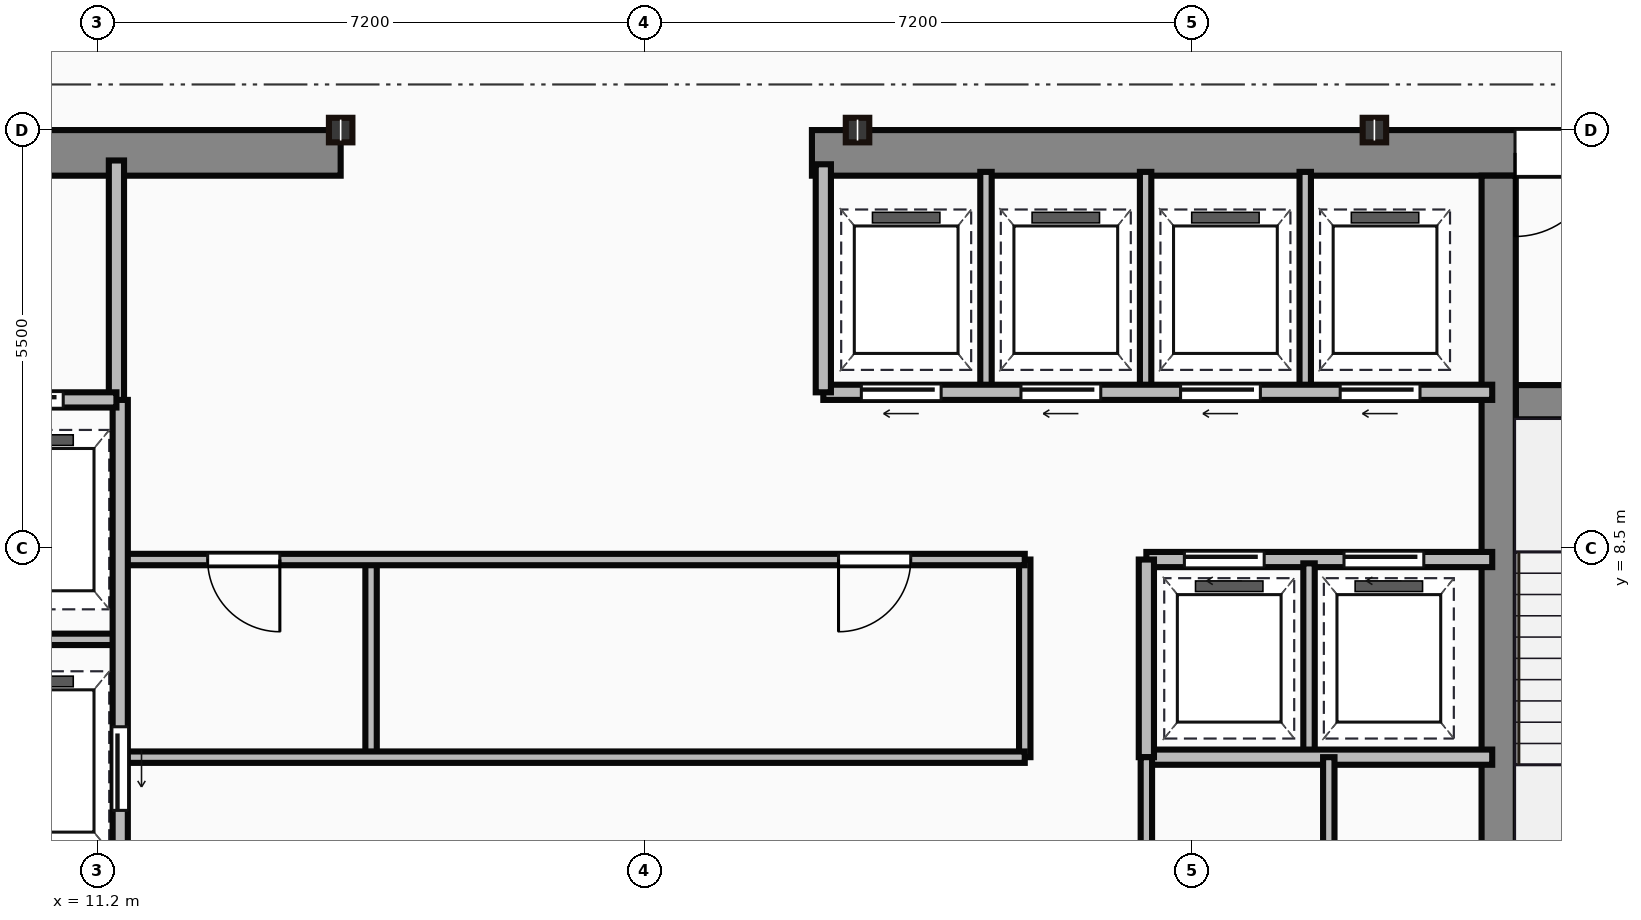
"""IFC4 building model, lengths in metres.
Left out: names, types, materials, properties, quantities, classifications, styles, units other than length and angle.
Written with IfcOpenShell. Run it as: python <this file> out.ifc"""

import sys

from ifc_helpers import new_model, si_unit, direction, frame, frame_2d, origin, origin_2d, place, context, subcontext, project, spatial, rectangle, i_section, extrude, source, transform, mapped, element, fill, save


model = new_model("IFC4")
c1 = context("Model", 3, precision=1e-05, world=origin(), true_north=direction((0.0, 1.0)))
c2 = subcontext(c1, "Body", "Model", "MODEL_VIEW")
j1 = project(units=[si_unit("LENGTHUNIT", "METRE"), si_unit("PLANEANGLEUNIT", "RADIAN")], contexts=[c1])
p1 = place(None, origin())
s1 = spatial("IfcSite", under=j1, at=p1, CompositionType="ELEMENT")
p2 = place(p1, origin())
s2 = spatial("IfcBuilding", under=s1, at=p2, CompositionType="ELEMENT")
p3 = place(p2, frame((0.0, 0.0, 192.25)))
s3 = spatial("IfcBuildingStorey", under=s2, at=p3, CompositionType="ELEMENT", Elevation=192.25)
m1 = source(origin(), c2, "Body", "SweptSolid", [
    extrude(rectangle(XDim=9.1, YDim=0.6, at=frame_2d((4.55, 0.0))), origin(), (0.0, 0.0, 1.0), 3.65),
])
p4 = place(p3, frame((5.3, 13.7, 0.0), z_axis=(0.0, 0.0, 1.0), x_axis=(1.0, 0.0, 0.0)))
e1 = element("IfcWall", 1, at=p4, inside=s3, PredefinedType="SHEAR", context=c2, shape_type="MappedRepresentation", body=[
    mapped(m1, transform((0.0, 0.0, 0.0))),
])
p5 = place(p4, frame((4.1, 0.0, 0.0)))
e2 = element("IfcOpeningElement", 2, at=p5, cuts=e1, PredefinedType="OPENING", context=c2, shape_type="SweptSolid", body=[
    extrude(rectangle(XDim=1.1, YDim=2.15, at=frame_2d((0.55, 1.075))), frame((0.0, 0.31, 0.0), z_axis=(0.0, -1.0, 0.0), x_axis=(1.0, 0.0, 0.0)), (0.0, 0.0, 1.0), 0.62),
])
m2 = source(origin(), c2, "Body", "SweptSolid", [
    extrude(rectangle(XDim=12.6, YDim=0.6, at=frame_2d((6.3, 0.0))), origin(), (0.0, 0.0, 1.0), 3.65),
])
p6 = place(p3, frame((20.6, 13.7, 0.0), z_axis=(0.0, 0.0, 1.0), x_axis=(1.0, 0.0, 0.0)))
e3 = element("IfcWall", 3, at=p6, inside=s3, PredefinedType="SHEAR", context=c2, shape_type="MappedRepresentation", body=[
    mapped(m2, transform((0.0, 0.0, 0.0))),
])
p7 = place(p6, frame((9.25, 0.0, 0.0)))
e4 = element("IfcOpeningElement", 4, at=p7, cuts=e3, PredefinedType="OPENING", context=c2, shape_type="SweptSolid", body=[
    extrude(rectangle(XDim=1.1, YDim=2.15, at=frame_2d((0.55, 1.075))), frame((0.0, 0.31, 0.0), z_axis=(0.0, -1.0, 0.0), x_axis=(1.0, 0.0, 0.0)), (0.0, 0.0, 1.0), 0.62),
])
m3 = source(origin(), c2, "Body", "SweptSolid", [
    extrude(rectangle(XDim=12.5, YDim=0.45, at=frame_2d((6.25, 0.0))), origin(), (0.0, 0.0, 1.0), 3.65),
])
p8 = place(p3, frame((29.635, 0.9, 0.0), z_axis=(0.0, 0.0, 1.0), x_axis=(0.0, 1.0, 0.0)))
e5 = element("IfcWall", 5, at=p8, inside=s3, PredefinedType="SHEAR", context=c2, shape_type="MappedRepresentation", body=[
    mapped(m3, transform((0.0, 0.0, 0.0))),
])
m4 = source(origin(), c2, "Body", "SweptSolid", [
    extrude(rectangle(XDim=3.39, YDim=0.45, at=frame_2d((1.695, 0.0))), origin(), (0.0, 0.0, 1.0), 3.65),
])
p9 = place(p3, frame((29.86, 10.42, 0.0), z_axis=(0.0, 0.0, 1.0), x_axis=(1.0, 0.0, 0.0)))
e6 = element("IfcWall", 6, at=p9, inside=s3, PredefinedType="SHEAR", context=c2, shape_type="MappedRepresentation", body=[
    mapped(m4, transform((0.0, 0.0, 0.0))),
])
p10 = place(p9, frame((1.1, 0.0, 0.0)))
e7 = element("IfcOpeningElement", 7, at=p10, cuts=e6, PredefinedType="OPENING", context=c2, shape_type="SweptSolid", body=[
    extrude(rectangle(XDim=1.1, YDim=2.15, at=frame_2d((0.55, 1.075))), frame((0.0, 0.235, 0.0), z_axis=(0.0, -1.0, 0.0), x_axis=(1.0, 0.0, 0.0)), (0.0, 0.0, 1.0), 0.47),
])
m5 = source(origin(), c2, "Body", "SweptSolid", [
    extrude(i_section(OverallWidth=0.309, OverallDepth=0.323, WebThickness=0.014, FlangeThickness=0.023, at=origin_2d()), origin(), (0.0, 0.0, 1.0), 3.65),
])
for number, where, z_axis, x_axis in (
    (8, (14.4, 14.0, 0.0), (0.0, 0.0, 1.0), (1.0, 0.0, 0.0)),
    (9, (21.2, 14.0, 0.0), (0.0, 0.0, 1.0), (1.0, 0.0, 0.0)),
    (10, (28.0, 14.0, 0.0), (0.0, 0.0, 1.0), (1.0, 0.0, 0.0)),
):
    element("IfcColumn", number, at=place(p3, frame(where, z_axis=z_axis, x_axis=x_axis)), inside=s3, PredefinedType="COLUMN", context=c2, shape_type="MappedRepresentation", body=[
        mapped(m5, transform((0.0, 0.0, 0.0))),
    ])
m6 = source(origin(), c2, "Body", "SweptSolid", [
    extrude(rectangle(XDim=3.18, YDim=0.2, at=frame_2d((1.59, 0.0))), origin(), (0.0, 0.0, 1.0), 3.4),
])
p11 = place(p3, frame((11.45, 10.42, 0.0), z_axis=(0.0, 0.0, 1.0), x_axis=(0.0, 1.0, 0.0)))
e11 = element("IfcWall", 11, at=p11, inside=s3, PredefinedType="PARTITIONING", context=c2, shape_type="MappedRepresentation", body=[
    mapped(m6, transform((0.0, 0.0, 0.0))),
])
m7 = source(origin(), c2, "Body", "SweptSolid", [
    extrude(rectangle(XDim=2.35, YDim=0.2, at=frame_2d((1.175, 0.0))), origin(), (0.0, 0.0, 1.0), 3.4),
])
p12 = place(p3, frame((9.1, 10.45, 0.0), z_axis=(0.0, 0.0, 1.0), x_axis=(1.0, 0.0, 0.0)))
e12 = element("IfcWall", 12, at=p12, inside=s3, PredefinedType="PARTITIONING", context=c2, shape_type="MappedRepresentation", body=[
    mapped(m7, transform((0.0, 0.0, 0.0))),
])
p13 = place(p12, frame((0.55, 0.0, 0.0)))
e13 = element("IfcOpeningElement", 13, at=p13, cuts=e12, PredefinedType="OPENING", context=c2, shape_type="SweptSolid", body=[
    extrude(rectangle(XDim=1.1, YDim=2.15, at=frame_2d((0.55, 1.075))), frame((0.0, 0.11, 0.0), z_axis=(0.0, -1.0, 0.0), x_axis=(1.0, 0.0, 0.0)), (0.0, 0.0, 1.0), 0.22),
])
m8 = source(origin(), c2, "Body", "SweptSolid", [
    extrude(rectangle(XDim=9.6, YDim=0.2, at=frame_2d((4.8, 0.0))), origin(), (0.0, 0.0, 1.0), 3.4),
])
p14 = place(p3, frame((11.5, 0.85, 0.0), z_axis=(0.0, 0.0, 1.0), x_axis=(0.0, 1.0, 0.0)))
e14 = element("IfcWall", 14, at=p14, inside=s3, PredefinedType="PARTITIONING", context=c2, shape_type="MappedRepresentation", body=[
    mapped(m8, transform((0.0, 0.0, 0.0))),
])
p15 = place(p14, frame((4.2, 0.0, 0.0)))
e15 = element("IfcOpeningElement", 15, at=p15, cuts=e14, PredefinedType="OPENING", context=c2, shape_type="SweptSolid", body=[
    extrude(rectangle(XDim=1.1, YDim=2.15, at=frame_2d((0.55, 1.075))), frame((0.0, 0.11, 0.0), z_axis=(0.0, -1.0, 0.0), x_axis=(1.0, 0.0, 0.0)), (0.0, 0.0, 1.0), 0.22),
])
p16 = place(p14, frame((0.9, 0.0, 0.0)))
e16 = element("IfcOpeningElement", 16, at=p16, cuts=e14, PredefinedType="OPENING", context=c2, shape_type="SweptSolid", body=[
    extrude(rectangle(XDim=1.2, YDim=2.15, at=frame_2d((0.6, 1.075))), frame((0.0, 0.11, 0.0), z_axis=(0.0, -1.0, 0.0), x_axis=(1.0, 0.0, 0.0)), (0.0, 0.0, 1.0), 0.22),
])
m9 = source(origin(), c2, "Body", "SweptSolid", [
    extrude(rectangle(XDim=2.4, YDim=0.15, at=frame_2d((1.2, 0.0))), origin(), (0.0, 0.0, 1.0), 3.4),
])
p17 = place(p3, frame((9.1, 7.3, 0.0), z_axis=(0.0, 0.0, 1.0), x_axis=(1.0, 0.0, 0.0)))
e17 = element("IfcWall", 17, at=p17, inside=s3, PredefinedType="PARTITIONING", context=c2, shape_type="MappedRepresentation", body=[
    mapped(m9, transform((0.0, 0.0, 0.0))),
])
m10 = source(origin(), c2, "Body", "SweptSolid", [
    extrude(rectangle(XDim=11.85, YDim=0.15, at=frame_2d((5.925, 0.0))), origin(), (0.0, 0.0, 1.0), 3.4),
])
p18 = place(p3, frame((11.55, 5.75, 0.0), z_axis=(0.0, 0.0, 1.0), x_axis=(1.0, 0.0, 0.0)))
e18 = element("IfcWall", 18, at=p18, inside=s3, PredefinedType="PARTITIONING", context=c2, shape_type="MappedRepresentation", body=[
    mapped(m10, transform((0.0, 0.0, 0.0))),
])
p19 = place(p3, frame((11.55, 8.35, 0.0), z_axis=(0.0, 0.0, 1.0), x_axis=(1.0, 0.0, 0.0)))
e19 = element("IfcWall", 19, at=p19, inside=s3, PredefinedType="PARTITIONING", context=c2, shape_type="MappedRepresentation", body=[
    mapped(m10, transform((0.0, 0.0, 0.0))),
])
p20 = place(p19, frame((1.1, 0.0, 0.0)))
e20 = element("IfcOpeningElement", 20, at=p20, cuts=e19, PredefinedType="OPENING", context=c2, shape_type="SweptSolid", body=[
    extrude(rectangle(XDim=0.95, YDim=2.15, at=frame_2d((0.475, 1.075))), frame((0.0, 0.085, 0.0), z_axis=(0.0, -1.0, 0.0), x_axis=(1.0, 0.0, 0.0)), (0.0, 0.0, 1.0), 0.17),
])
p21 = place(p19, frame((9.4, 0.0, 0.0)))
e21 = element("IfcOpeningElement", 21, at=p21, cuts=e19, PredefinedType="OPENING", context=c2, shape_type="SweptSolid", body=[
    extrude(rectangle(XDim=0.95, YDim=2.15, at=frame_2d((0.475, 1.075))), frame((0.0, 0.085, 0.0), z_axis=(0.0, -1.0, 0.0), x_axis=(1.0, 0.0, 0.0)), (0.0, 0.0, 1.0), 0.17),
])
m11 = source(origin(), c2, "Body", "SweptSolid", [
    extrude(rectangle(XDim=2.6, YDim=0.15, at=frame_2d((1.3, 0.0))), origin(), (0.0, 0.0, 1.0), 3.4),
])
p22 = place(p3, frame((23.4, 5.75, 0.0), z_axis=(0.0, 0.0, 1.0), x_axis=(0.0, 1.0, 0.0)))
e22 = element("IfcWall", 22, at=p22, inside=s3, PredefinedType="PARTITIONING", context=c2, shape_type="MappedRepresentation", body=[
    mapped(m11, transform((0.0, 0.0, 0.0))),
])
m12 = source(origin(), c2, "Body", "SweptSolid", [
    extrude(rectangle(XDim=2.5, YDim=0.15, at=frame_2d((1.25, 0.0))), origin(), (0.0, 0.0, 1.0), 3.4),
])
p23 = place(p3, frame((14.8, 5.8, 0.0), z_axis=(0.0, 0.0, 1.0), x_axis=(0.0, 1.0, 0.0)))
e23 = element("IfcWall", 23, at=p23, inside=s3, PredefinedType="PARTITIONING", context=c2, shape_type="MappedRepresentation", body=[
    mapped(m12, transform((0.0, 0.0, 0.0))),
])
m13 = source(origin(), c2, "Body", "SweptSolid", [
    extrude(rectangle(XDim=8.8, YDim=0.2, at=frame_2d((4.4, 0.0))), origin(), (0.0, 0.0, 1.0), 3.4),
])
p24 = place(p3, frame((20.75, 10.55, 0.0), z_axis=(0.0, 0.0, 1.0), x_axis=(1.0, 0.0, 0.0)))
e24 = element("IfcWall", 24, at=p24, inside=s3, PredefinedType="PARTITIONING", context=c2, shape_type="MappedRepresentation", body=[
    mapped(m13, transform((0.0, 0.0, 0.0))),
])
p25 = place(p24, frame((0.5, 0.0, 0.0)))
e25 = element("IfcOpeningElement", 25, at=p25, cuts=e24, PredefinedType="OPENING", context=c2, shape_type="SweptSolid", body=[
    extrude(rectangle(XDim=1.05, YDim=2.15, at=frame_2d((0.525, 1.075))), frame((0.0, 0.11, 0.0), z_axis=(0.0, -1.0, 0.0), x_axis=(1.0, 0.0, 0.0)), (0.0, 0.0, 1.0), 0.22),
])
p26 = place(p24, frame((2.6, 0.0, 0.0)))
e26 = element("IfcOpeningElement", 26, at=p26, cuts=e24, PredefinedType="OPENING", context=c2, shape_type="SweptSolid", body=[
    extrude(rectangle(XDim=1.05, YDim=2.15, at=frame_2d((0.525, 1.075))), frame((0.0, 0.11, 0.0), z_axis=(0.0, -1.0, 0.0), x_axis=(1.0, 0.0, 0.0)), (0.0, 0.0, 1.0), 0.22),
])
p27 = place(p24, frame((4.7, 0.0, 0.0)))
e27 = element("IfcOpeningElement", 27, at=p27, cuts=e24, PredefinedType="OPENING", context=c2, shape_type="SweptSolid", body=[
    extrude(rectangle(XDim=1.05, YDim=2.15, at=frame_2d((0.525, 1.075))), frame((0.0, 0.11, 0.0), z_axis=(0.0, -1.0, 0.0), x_axis=(1.0, 0.0, 0.0)), (0.0, 0.0, 1.0), 0.22),
])
p28 = place(p24, frame((6.8, 0.0, 0.0)))
e28 = element("IfcOpeningElement", 28, at=p28, cuts=e24, PredefinedType="OPENING", context=c2, shape_type="SweptSolid", body=[
    extrude(rectangle(XDim=1.05, YDim=2.15, at=frame_2d((0.525, 1.075))), frame((0.0, 0.11, 0.0), z_axis=(0.0, -1.0, 0.0), x_axis=(1.0, 0.0, 0.0)), (0.0, 0.0, 1.0), 0.22),
])
m14 = source(origin(), c2, "Body", "SweptSolid", [
    extrude(rectangle(XDim=3.0, YDim=0.2, at=frame_2d((1.5, 0.0))), origin(), (0.0, 0.0, 1.0), 3.4),
])
p29 = place(p3, frame((20.75, 10.55, 0.0), z_axis=(0.0, 0.0, 1.0), x_axis=(0.0, 1.0, 0.0)))
e29 = element("IfcWall", 29, at=p29, inside=s3, PredefinedType="PARTITIONING", context=c2, shape_type="MappedRepresentation", body=[
    mapped(m14, transform((0.0, 0.0, 0.0))),
])
m15 = source(origin(), c2, "Body", "SweptSolid", [
    extrude(rectangle(XDim=2.85, YDim=0.15, at=frame_2d((1.425, 0.0))), origin(), (0.0, 0.0, 1.0), 3.4),
])
for number, where, z_axis, x_axis in (
    (30, (22.89, 10.6, 0.0), (0.0, 0.0, 1.0), (0.0, 1.0, 0.0)),
    (31, (24.99, 10.6, 0.0), (0.0, 0.0, 1.0), (0.0, 1.0, 0.0)),
    (32, (27.09, 10.6, 0.0), (0.0, 0.0, 1.0), (0.0, 1.0, 0.0)),
):
    element("IfcWall", number, at=place(p3, frame(where, z_axis=z_axis, x_axis=x_axis)), inside=s3, PredefinedType="PARTITIONING", context=c2, shape_type="MappedRepresentation", body=[
        mapped(m15, transform((0.0, 0.0, 0.0))),
    ])
m16 = source(origin(), c2, "Body", "SweptSolid", [
    extrude(rectangle(XDim=4.55, YDim=0.2, at=frame_2d((2.275, 0.0))), origin(), (0.0, 0.0, 1.0), 3.4),
])
p30 = place(p3, frame((25.0, 8.35, 0.0), z_axis=(0.0, 0.0, 1.0), x_axis=(1.0, 0.0, 0.0)))
e33 = element("IfcWall", 33, at=p30, inside=s3, PredefinedType="PARTITIONING", context=c2, shape_type="MappedRepresentation", body=[
    mapped(m16, transform((0.0, 0.0, 0.0))),
])
p31 = place(p30, frame((0.5, 0.0, 0.0)))
e34 = element("IfcOpeningElement", 34, at=p31, cuts=e33, PredefinedType="OPENING", context=c2, shape_type="SweptSolid", body=[
    extrude(rectangle(XDim=1.05, YDim=2.15, at=frame_2d((0.525, 1.075))), frame((0.0, 0.11, 0.0), z_axis=(0.0, -1.0, 0.0), x_axis=(1.0, 0.0, 0.0)), (0.0, 0.0, 1.0), 0.22),
])
p32 = place(p30, frame((2.6, 0.0, 0.0)))
e35 = element("IfcOpeningElement", 35, at=p32, cuts=e33, PredefinedType="OPENING", context=c2, shape_type="SweptSolid", body=[
    extrude(rectangle(XDim=1.05, YDim=2.15, at=frame_2d((0.525, 1.075))), frame((0.0, 0.11, 0.0), z_axis=(0.0, -1.0, 0.0), x_axis=(1.0, 0.0, 0.0)), (0.0, 0.0, 1.0), 0.22),
])
p33 = place(p3, frame((25.0, 5.75, 0.0), z_axis=(0.0, 0.0, 1.0), x_axis=(1.0, 0.0, 0.0)))
e36 = element("IfcWall", 36, at=p33, inside=s3, PredefinedType="PARTITIONING", context=c2, shape_type="MappedRepresentation", body=[
    mapped(m16, transform((0.0, 0.0, 0.0))),
])
m17 = source(origin(), c2, "Body", "SweptSolid", [
    extrude(rectangle(XDim=2.6, YDim=0.2, at=frame_2d((1.3, 0.0))), origin(), (0.0, 0.0, 1.0), 3.4),
])
p34 = place(p3, frame((25.0, 5.75, 0.0), z_axis=(0.0, 0.0, 1.0), x_axis=(0.0, 1.0, 0.0)))
e37 = element("IfcWall", 37, at=p34, inside=s3, PredefinedType="PARTITIONING", context=c2, shape_type="MappedRepresentation", body=[
    mapped(m17, transform((0.0, 0.0, 0.0))),
])
p35 = place(p3, frame((27.14, 5.8, 0.0), z_axis=(0.0, 0.0, 1.0), x_axis=(0.0, 1.0, 0.0)))
e38 = element("IfcWall", 38, at=p35, inside=s3, PredefinedType="PARTITIONING", context=c2, shape_type="MappedRepresentation", body=[
    mapped(m12, transform((0.0, 0.0, 0.0))),
])
m18 = source(origin(), c2, "Body", "SweptSolid", [
    extrude(rectangle(XDim=4.9, YDim=0.15, at=frame_2d((2.45, 0.0))), origin(), (0.0, 0.0, 1.0), 3.4),
])
p36 = place(p3, frame((25.0, 0.85, 0.0), z_axis=(0.0, 0.0, 1.0), x_axis=(0.0, 1.0, 0.0)))
e39 = element("IfcWall", 39, at=p36, inside=s3, PredefinedType="PARTITIONING", context=c2, shape_type="MappedRepresentation", body=[
    mapped(m18, transform((0.0, 0.0, 0.0))),
])
p37 = place(p36, frame((2.5, 0.0, 0.0)))
e40 = element("IfcOpeningElement", 40, at=p37, cuts=e39, PredefinedType="OPENING", context=c2, shape_type="SweptSolid", body=[
    extrude(rectangle(XDim=0.95, YDim=2.15, at=frame_2d((0.475, 1.075))), frame((0.0, 0.085, 0.0), z_axis=(0.0, -1.0, 0.0), x_axis=(1.0, 0.0, 0.0)), (0.0, 0.0, 1.0), 0.17),
])
m19 = source(origin(), c2, "Body", "SweptSolid", [
    extrude(rectangle(XDim=3.4, YDim=0.15, at=frame_2d((1.7, 0.0))), origin(), (0.0, 0.0, 1.0), 3.4),
])
p38 = place(p3, frame((27.4, 2.35, 0.0), z_axis=(0.0, 0.0, 1.0), x_axis=(0.0, 1.0, 0.0)))
e41 = element("IfcWall", 41, at=p38, inside=s3, PredefinedType="PARTITIONING", context=c2, shape_type="MappedRepresentation", body=[
    mapped(m19, transform((0.0, 0.0, 0.0))),
])
p39 = place(p38, frame((1.1, 0.0, 0.0)))
e42 = element("IfcOpeningElement", 42, at=p39, cuts=e41, PredefinedType="OPENING", context=c2, shape_type="SweptSolid", body=[
    extrude(rectangle(XDim=0.85, YDim=2.1, at=frame_2d((0.425, 1.05))), frame((0.0, 0.085, 0.0), z_axis=(0.0, -1.0, 0.0), x_axis=(1.0, 0.0, 0.0)), (0.0, 0.0, 1.0), 0.17),
])
m20 = source(origin(), c2, "Body", "SweptSolid", [
    extrude(rectangle(XDim=1.1, YDim=2.15, at=frame_2d((0.55, 1.075))), frame((0.0, 0.025, 0.0), z_axis=(0.0, -1.0, 0.0), x_axis=(1.0, 0.0, 0.0)), (0.0, 0.0, 1.0), 0.05),
])
p40 = place(p7, origin())
e43 = element("IfcDoor", 43, at=p40, inside=s3, OperationType="SINGLE_SWING_LEFT", PredefinedType="DOOR", context=c2, shape_type="MappedRepresentation", body=[
    mapped(m20, transform((0.0, 0.0, 0.0))),
])
fill(e4, e43)
p41 = place(p13, origin())
e44 = element("IfcDoor", 44, at=p41, inside=s3, OperationType="SLIDING_TO_LEFT", PredefinedType="DOOR", context=c2, shape_type="MappedRepresentation", body=[
    mapped(m20, transform((0.0, 0.0, 0.0))),
])
fill(e13, e44)
p42 = place(p15, frame((1.1, 0.0, 0.0), z_axis=(0.0, 0.0, 1.0), x_axis=(-1.0, 0.0, 0.0)))
e45 = element("IfcDoor", 45, at=p42, inside=s3, OperationType="SLIDING_TO_LEFT", PredefinedType="DOOR", context=c2, shape_type="MappedRepresentation", body=[
    mapped(m20, transform((0.0, 0.0, 0.0))),
])
fill(e15, e45)
m21 = source(origin(), c2, "Body", "SweptSolid", [
    extrude(rectangle(XDim=0.95, YDim=2.15, at=frame_2d((0.475, 1.075))), frame((0.0, 0.025, 0.0), z_axis=(0.0, -1.0, 0.0), x_axis=(1.0, 0.0, 0.0)), (0.0, 0.0, 1.0), 0.05),
])
p43 = place(p20, origin())
e46 = element("IfcDoor", 46, at=p43, inside=s3, OperationType="SINGLE_SWING_RIGHT", PredefinedType="DOOR", context=c2, shape_type="MappedRepresentation", body=[
    mapped(m21, transform((0.0, 0.0, 0.0))),
])
fill(e20, e46)
p44 = place(p21, origin())
e47 = element("IfcDoor", 47, at=p44, inside=s3, OperationType="SINGLE_SWING_LEFT", PredefinedType="DOOR", context=c2, shape_type="MappedRepresentation", body=[
    mapped(m21, transform((0.0, 0.0, 0.0))),
])
fill(e21, e47)
m22 = source(origin(), c2, "Body", "SweptSolid", [
    extrude(rectangle(XDim=1.05, YDim=2.15, at=frame_2d((0.525, 1.075))), frame((0.0, 0.025, 0.0), z_axis=(0.0, -1.0, 0.0), x_axis=(1.0, 0.0, 0.0)), (0.0, 0.0, 1.0), 0.05),
])
p45 = place(p25, frame((1.05, 0.0, 0.0), z_axis=(0.0, 0.0, 1.0), x_axis=(-1.0, 0.0, 0.0)))
e48 = element("IfcDoor", 48, at=p45, inside=s3, OperationType="SLIDING_TO_LEFT", PredefinedType="DOOR", context=c2, shape_type="MappedRepresentation", body=[
    mapped(m22, transform((0.0, 0.0, 0.0))),
])
fill(e25, e48)
p46 = place(p26, frame((1.05, 0.0, 0.0), z_axis=(0.0, 0.0, 1.0), x_axis=(-1.0, 0.0, 0.0)))
e49 = element("IfcDoor", 49, at=p46, inside=s3, OperationType="SLIDING_TO_LEFT", PredefinedType="DOOR", context=c2, shape_type="MappedRepresentation", body=[
    mapped(m22, transform((0.0, 0.0, 0.0))),
])
fill(e26, e49)
p47 = place(p27, frame((1.05, 0.0, 0.0), z_axis=(0.0, 0.0, 1.0), x_axis=(-1.0, 0.0, 0.0)))
e50 = element("IfcDoor", 50, at=p47, inside=s3, OperationType="SLIDING_TO_LEFT", PredefinedType="DOOR", context=c2, shape_type="MappedRepresentation", body=[
    mapped(m22, transform((0.0, 0.0, 0.0))),
])
fill(e27, e50)
p48 = place(p28, frame((1.05, 0.0, 0.0), z_axis=(0.0, 0.0, 1.0), x_axis=(-1.0, 0.0, 0.0)))
e51 = element("IfcDoor", 51, at=p48, inside=s3, OperationType="SLIDING_TO_LEFT", PredefinedType="DOOR", context=c2, shape_type="MappedRepresentation", body=[
    mapped(m22, transform((0.0, 0.0, 0.0))),
])
fill(e28, e51)
p49 = place(p31, origin())
e52 = element("IfcDoor", 52, at=p49, inside=s3, OperationType="SLIDING_TO_LEFT", PredefinedType="DOOR", context=c2, shape_type="MappedRepresentation", body=[
    mapped(m22, transform((0.0, 0.0, 0.0))),
])
fill(e34, e52)
p50 = place(p32, origin())
e53 = element("IfcDoor", 53, at=p50, inside=s3, OperationType="SLIDING_TO_LEFT", PredefinedType="DOOR", context=c2, shape_type="MappedRepresentation", body=[
    mapped(m22, transform((0.0, 0.0, 0.0))),
])
fill(e35, e53)
save(model, sys.argv[1])
